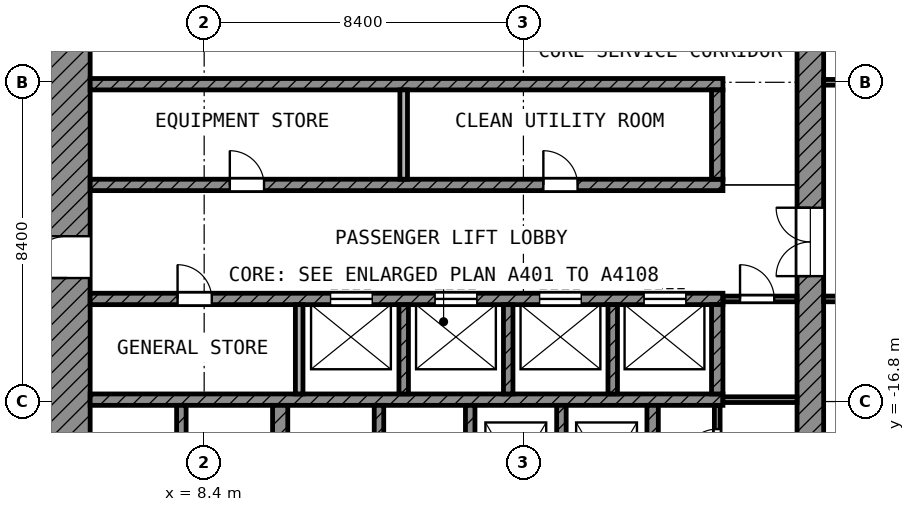
"""IFC4 building model, lengths in metres.
Left out: names, types, materials, properties, quantities, classifications, styles, units other than length and angle.
Written with IfcOpenShell. Run it as: python <this file> out.ifc"""

import sys

from ifc_helpers import new_model, si_unit, direction, frame, frame_2d, origin, place, context, subcontext, project, spatial, rectangle, extrude, element, fill, save


model = new_model("IFC4")
c1 = context("Model", 3, precision=1e-05, world=origin(), true_north=direction((0.0, 1.0)))
c2 = subcontext(c1, "Body", "Model", "MODEL_VIEW")
j1 = project(units=[si_unit("LENGTHUNIT", "METRE"), si_unit("PLANEANGLEUNIT", "RADIAN")], contexts=[c1])
p1 = place(None, origin())
s1 = spatial("IfcSite", under=j1, at=p1, CompositionType="ELEMENT")
p2 = place(p1, origin())
s2 = spatial("IfcBuilding", under=s1, at=p2, CompositionType="ELEMENT")
p3 = place(p2, frame((0.0, 0.0, 302.8)))
s3 = spatial("IfcBuildingStorey", under=s2, at=p3, CompositionType="ELEMENT", Elevation=302.8)
p4 = place(p3, frame((4.8, -24.7, 0.0), z_axis=(0.0, 0.0, 1.0), x_axis=(0.0, 1.0, 0.0)))
e1 = element("IfcWall", 1, at=p4, inside=s3, PredefinedType="SHEAR", context=c2, shape_type="SweptSolid", body=[
    extrude(rectangle(XDim=19.3, YDim=1.2, at=frame_2d((9.65, 0.0))), origin(), (0.0, 0.0, 1.0), 3.6),
])
p5 = place(p4, frame((11.15, 0.0, 0.0)))
e2 = element("IfcOpeningElement", 2, at=p5, cuts=e1, PredefinedType="OPENING", context=c2, shape_type="SweptSolid", body=[
    extrude(rectangle(XDim=1.1, YDim=2.1, at=frame_2d((0.55, 1.05))), frame((0.0, 0.61, 0.0), z_axis=(0.0, -1.0, 0.0), x_axis=(1.0, 0.0, 0.0)), (0.0, 0.0, 1.0), 1.22),
])
p6 = place(p4, frame((1.85, 0.0, 0.0)))
e3 = element("IfcOpeningElement", 3, at=p6, cuts=e1, PredefinedType="OPENING", context=c2, shape_type="SweptSolid", body=[
    extrude(rectangle(XDim=1.1, YDim=2.1, at=frame_2d((0.55, 1.05))), frame((0.0, 0.61, 0.0), z_axis=(0.0, -1.0, 0.0), x_axis=(1.0, 0.0, 0.0)), (0.0, 0.0, 1.0), 1.22),
])
p7 = place(p3, frame((24.35, -24.0, 0.0), z_axis=(0.0, 0.0, 1.0), x_axis=(0.0, 1.0, 0.0)))
e4 = element("IfcWall", 4, at=p7, inside=s3, PredefinedType="SHEAR", context=c2, shape_type="SweptSolid", body=[
    extrude(rectangle(XDim=18.6, YDim=0.7, at=frame_2d((9.3, 0.0))), origin(), (0.0, 0.0, 1.0), 3.6),
])
p8 = place(p7, frame((10.5, 0.0, 0.0)))
e5 = element("IfcOpeningElement", 5, at=p8, cuts=e4, PredefinedType="OPENING", context=c2, shape_type="SweptSolid", body=[
    extrude(rectangle(XDim=1.8, YDim=2.1, at=frame_2d((0.9, 1.05))), frame((0.0, 0.36, 0.0), z_axis=(0.0, -1.0, 0.0), x_axis=(1.0, 0.0, 0.0)), (0.0, 0.0, 1.0), 0.72),
])
p9 = place(p3, frame((5.4, -8.45, 0.0), z_axis=(0.0, 0.0, 1.0), x_axis=(1.0, 0.0, 0.0)))
e6 = element("IfcWall", 6, at=p9, inside=s3, PredefinedType="SHEAR", context=c2, shape_type="SweptSolid", body=[
    extrude(rectangle(XDim=16.65, YDim=0.3, at=frame_2d((8.325, 0.0))), origin(), (0.0, 0.0, 1.0), 3.6),
])
p10 = place(p3, frame((5.4, -11.1, 0.0), z_axis=(0.0, 0.0, 1.0), x_axis=(1.0, 0.0, 0.0)))
e7 = element("IfcWall", 7, at=p10, inside=s3, PredefinedType="SHEAR", context=c2, shape_type="SweptSolid", body=[
    extrude(rectangle(XDim=16.65, YDim=0.3, at=frame_2d((8.325, 0.0))), origin(), (0.0, 0.0, 1.0), 3.6),
])
p11 = place(p10, frame((3.675, 0.0, 0.0)))
e8 = element("IfcOpeningElement", 8, at=p11, cuts=e7, PredefinedType="OPENING", context=c2, shape_type="SweptSolid", body=[
    extrude(rectangle(XDim=0.9, YDim=2.1, at=frame_2d((0.45, 1.05))), frame((0.0, 0.16, 0.0), z_axis=(0.0, -1.0, 0.0), x_axis=(1.0, 0.0, 0.0)), (0.0, 0.0, 1.0), 0.32),
])
p12 = place(p10, frame((11.925, 0.0, 0.0)))
e9 = element("IfcOpeningElement", 9, at=p12, cuts=e7, PredefinedType="OPENING", context=c2, shape_type="SweptSolid", body=[
    extrude(rectangle(XDim=0.9, YDim=2.1, at=frame_2d((0.45, 1.05))), frame((0.0, 0.16, 0.0), z_axis=(0.0, -1.0, 0.0), x_axis=(1.0, 0.0, 0.0)), (0.0, 0.0, 1.0), 0.32),
])
p13 = place(p3, frame((5.4, -14.1, 0.0), z_axis=(0.0, 0.0, 1.0), x_axis=(1.0, 0.0, 0.0)))
e10 = element("IfcWall", 10, at=p13, inside=s3, PredefinedType="SHEAR", context=c2, shape_type="SweptSolid", body=[
    extrude(rectangle(XDim=16.65, YDim=0.3, at=frame_2d((8.325, 0.0))), origin(), (0.0, 0.0, 1.0), 3.6),
])
p14 = place(p13, frame((6.325, 0.0, 0.0)))
e11 = element("IfcOpeningElement", 11, at=p14, cuts=e10, PredefinedType="OPENING", context=c2, shape_type="SweptSolid", body=[
    extrude(rectangle(XDim=1.1, YDim=2.1, at=frame_2d((0.55, 1.05))), frame((0.0, 0.16, 0.0), z_axis=(0.0, -1.0, 0.0), x_axis=(1.0, 0.0, 0.0)), (0.0, 0.0, 1.0), 0.32),
])
p15 = place(p13, frame((9.075, 0.0, 0.0)))
e12 = element("IfcOpeningElement", 12, at=p15, cuts=e10, PredefinedType="OPENING", context=c2, shape_type="SweptSolid", body=[
    extrude(rectangle(XDim=1.1, YDim=2.1, at=frame_2d((0.55, 1.05))), frame((0.0, 0.16, 0.0), z_axis=(0.0, -1.0, 0.0), x_axis=(1.0, 0.0, 0.0)), (0.0, 0.0, 1.0), 0.32),
])
p16 = place(p13, frame((11.825, 0.0, 0.0)))
e13 = element("IfcOpeningElement", 13, at=p16, cuts=e10, PredefinedType="OPENING", context=c2, shape_type="SweptSolid", body=[
    extrude(rectangle(XDim=1.1, YDim=2.1, at=frame_2d((0.55, 1.05))), frame((0.0, 0.16, 0.0), z_axis=(0.0, -1.0, 0.0), x_axis=(1.0, 0.0, 0.0)), (0.0, 0.0, 1.0), 0.32),
])
p17 = place(p13, frame((14.575, 0.0, 0.0)))
e14 = element("IfcOpeningElement", 14, at=p17, cuts=e10, PredefinedType="OPENING", context=c2, shape_type="SweptSolid", body=[
    extrude(rectangle(XDim=1.1, YDim=2.1, at=frame_2d((0.55, 1.05))), frame((0.0, 0.16, 0.0), z_axis=(0.0, -1.0, 0.0), x_axis=(1.0, 0.0, 0.0)), (0.0, 0.0, 1.0), 0.32),
])
p18 = place(p13, frame((2.3, 0.0, 0.0)))
e15 = element("IfcOpeningElement", 15, at=p18, cuts=e10, PredefinedType="OPENING", context=c2, shape_type="SweptSolid", body=[
    extrude(rectangle(XDim=0.9, YDim=2.1, at=frame_2d((0.45, 1.05))), frame((0.0, 0.16, 0.0), z_axis=(0.0, -1.0, 0.0), x_axis=(1.0, 0.0, 0.0)), (0.0, 0.0, 1.0), 0.32),
])
p19 = place(p3, frame((5.4, -16.75, 0.0), z_axis=(0.0, 0.0, 1.0), x_axis=(1.0, 0.0, 0.0)))
e16 = element("IfcWall", 16, at=p19, inside=s3, PredefinedType="SHEAR", context=c2, shape_type="SweptSolid", body=[
    extrude(rectangle(XDim=16.65, YDim=0.3, at=frame_2d((8.325, 0.0))), origin(), (0.0, 0.0, 1.0), 3.6),
])
p20 = place(p3, frame((10.4, -20.05, 0.0), z_axis=(0.0, 0.0, 1.0), x_axis=(0.0, 1.0, 0.0)))
e17 = element("IfcWall", 17, at=p20, inside=s3, PredefinedType="SHEAR", context=c2, shape_type="SweptSolid", body=[
    extrude(rectangle(XDim=3.15, YDim=0.4, at=frame_2d((1.575, 0.0))), origin(), (0.0, 0.0, 1.0), 3.6),
])
p21 = place(p3, frame((20.2, -20.35, 0.0), z_axis=(0.0, 0.0, 1.0), x_axis=(0.0, 1.0, 0.0)))
e18 = element("IfcWall", 18, at=p21, inside=s3, PredefinedType="SHEAR", context=c2, shape_type="SweptSolid", body=[
    extrude(rectangle(XDim=3.45, YDim=0.3, at=frame_2d((1.725, 0.0))), origin(), (0.0, 0.0, 1.0), 3.6),
])
p22 = place(p3, frame((21.9, -10.95, 0.0), z_axis=(0.0, 0.0, 1.0), x_axis=(0.0, 1.0, 0.0)))
e19 = element("IfcWall", 19, at=p22, inside=s3, PredefinedType="SHEAR", context=c2, shape_type="SweptSolid", body=[
    extrude(rectangle(XDim=2.35, YDim=0.3, at=frame_2d((1.175, 0.0))), origin(), (0.0, 0.0, 1.0), 3.6),
])
p23 = place(p3, frame((21.9, -16.6, 0.0), z_axis=(0.0, 0.0, 1.0), x_axis=(0.0, 1.0, 0.0)))
e20 = element("IfcWall", 20, at=p23, inside=s3, PredefinedType="SHEAR", context=c2, shape_type="SweptSolid", body=[
    extrude(rectangle(XDim=2.35, YDim=0.3, at=frame_2d((1.175, 0.0))), origin(), (0.0, 0.0, 1.0), 3.6),
])
for number, where, z_axis, x_axis in (
    (21, (7.8, -20.05, 0.0), (0.0, 0.0, 1.0), (0.0, 1.0, 0.0)),
    (22, (13.0, -20.05, 0.0), (0.0, 0.0, 1.0), (0.0, 1.0, 0.0)),
    (23, (15.4, -20.05, 0.0), (0.0, 0.0, 1.0), (0.0, 1.0, 0.0)),
    (24, (17.8, -20.05, 0.0), (0.0, 0.0, 1.0), (0.0, 1.0, 0.0)),
):
    element("IfcWall", number, at=place(p3, frame(where, z_axis=z_axis, x_axis=x_axis)), inside=s3, PredefinedType="SHEAR", context=c2, shape_type="SweptSolid", body=[
        extrude(rectangle(XDim=3.15, YDim=0.25, at=frame_2d((1.575, 0.0))), origin(), (0.0, 0.0, 1.0), 3.6),
    ])
p24 = place(p3, frame((13.65, -10.95, 0.0), z_axis=(0.0, 0.0, 1.0), x_axis=(0.0, 1.0, 0.0)))
e25 = element("IfcWall", 25, at=p24, inside=s3, PredefinedType="PARTITIONING", context=c2, shape_type="SweptSolid", body=[
    extrude(rectangle(XDim=2.35, YDim=0.2, at=frame_2d((1.175, 0.0))), origin(), (0.0, 0.0, 1.0), 3.6),
])
p25 = place(p3, frame((10.9, -16.6, 0.0), z_axis=(0.0, 0.0, 1.0), x_axis=(0.0, 1.0, 0.0)))
e26 = element("IfcWall", 26, at=p25, inside=s3, PredefinedType="PARTITIONING", context=c2, shape_type="SweptSolid", body=[
    extrude(rectangle(XDim=2.35, YDim=0.2, at=frame_2d((1.175, 0.0))), origin(), (0.0, 0.0, 1.0), 3.6),
])
for number, where, z_axis, x_axis in (
    (27, (13.65, -16.6, 0.0), (0.0, 0.0, 1.0), (0.0, 1.0, 0.0)),
    (28, (16.4, -16.6, 0.0), (0.0, 0.0, 1.0), (0.0, 1.0, 0.0)),
    (29, (19.15, -16.6, 0.0), (0.0, 0.0, 1.0), (0.0, 1.0, 0.0)),
):
    element("IfcWall", number, at=place(p3, frame(where, z_axis=z_axis, x_axis=x_axis)), inside=s3, PredefinedType="SHEAR", context=c2, shape_type="SweptSolid", body=[
        extrude(rectangle(XDim=2.35, YDim=0.25, at=frame_2d((1.175, 0.0))), origin(), (0.0, 0.0, 1.0), 3.6),
    ])
p26 = place(p3, frame((21.9, -19.05, 0.0), z_axis=(0.0, 0.0, 1.0), x_axis=(0.0, 1.0, 0.0)))
e30 = element("IfcWall", 30, at=p26, inside=s3, PredefinedType="PARTITIONING", context=c2, shape_type="SweptSolid", body=[
    extrude(rectangle(XDim=2.15, YDim=0.15, at=frame_2d((1.075, 0.0))), origin(), (0.0, 0.0, 1.0), 3.6),
])
p27 = place(p26, frame((0.625, 0.0, 0.0)))
e31 = element("IfcOpeningElement", 31, at=p27, cuts=e30, PredefinedType="OPENING", context=c2, shape_type="SweptSolid", body=[
    extrude(rectangle(XDim=0.9, YDim=2.1, at=frame_2d((0.45, 1.05))), frame((0.0, 0.085, 0.0), z_axis=(0.0, -1.0, 0.0), x_axis=(1.0, 0.0, 0.0)), (0.0, 0.0, 1.0), 0.17),
])
p28 = place(p3, frame((22.05, -16.75, 0.0), z_axis=(0.0, 0.0, 1.0), x_axis=(1.0, 0.0, 0.0)))
e32 = element("IfcWall", 32, at=p28, inside=s3, PredefinedType="PARTITIONING", context=c2, shape_type="SweptSolid", body=[
    extrude(rectangle(XDim=1.95, YDim=0.15, at=frame_2d((0.975, 0.0))), origin(), (0.0, 0.0, 1.0), 3.6),
])
p29 = place(p3, frame((22.05, -14.1, 0.0), z_axis=(0.0, 0.0, 1.0), x_axis=(1.0, 0.0, 0.0)))
e33 = element("IfcWall", 33, at=p29, inside=s3, PredefinedType="PARTITIONING", context=c2, shape_type="SweptSolid", body=[
    extrude(rectangle(XDim=1.95, YDim=0.15, at=frame_2d((0.975, 0.0))), origin(), (0.0, 0.0, 1.0), 3.6),
])
p30 = place(p29, frame((0.45, 0.0, 0.0)))
e34 = element("IfcOpeningElement", 34, at=p30, cuts=e33, PredefinedType="OPENING", context=c2, shape_type="SweptSolid", body=[
    extrude(rectangle(XDim=0.9, YDim=2.1, at=frame_2d((0.45, 1.05))), frame((0.0, 0.085, 0.0), z_axis=(0.0, -1.0, 0.0), x_axis=(1.0, 0.0, 0.0)), (0.0, 0.0, 1.0), 0.17),
])
p31 = place(p3, frame((24.7, -14.1, 0.0), z_axis=(0.0, 0.0, 1.0), x_axis=(1.0, 0.0, 0.0)))
e35 = element("IfcWall", 35, at=p31, inside=s3, PredefinedType="PARTITIONING", context=c2, shape_type="SweptSolid", body=[
    extrude(rectangle(XDim=4.625, YDim=0.15, at=frame_2d((2.312, 0.0))), origin(), (0.0, 0.0, 1.0), 3.6),
])
p32 = place(p31, frame((1.85, 0.0, 0.0)))
e36 = element("IfcOpeningElement", 36, at=p32, cuts=e35, PredefinedType="OPENING", context=c2, shape_type="SweptSolid", body=[
    extrude(rectangle(XDim=1.5, YDim=2.1, at=frame_2d((0.75, 1.05))), frame((0.0, 0.085, 0.0), z_axis=(0.0, -1.0, 0.0), x_axis=(1.0, 0.0, 0.0)), (0.0, 0.0, 1.0), 0.17),
])
p33 = place(p3, frame((24.7, -8.4, 0.0), z_axis=(0.0, 0.0, 1.0), x_axis=(1.0, 0.0, 0.0)))
e37 = element("IfcWall", 37, at=p33, inside=s3, PredefinedType="PARTITIONING", context=c2, shape_type="SweptSolid", body=[
    extrude(rectangle(XDim=15.582, YDim=0.15, at=frame_2d((7.791, 0.0))), origin(), (0.0, 0.0, 1.0), 3.6),
])
p34 = place(p33, frame((9.35, 0.0, 0.0)))
e38 = element("IfcOpeningElement", 38, at=p34, cuts=e37, PredefinedType="OPENING", context=c2, shape_type="SweptSolid", body=[
    extrude(rectangle(XDim=1.1, YDim=2.1, at=frame_2d((0.55, 1.05))), frame((0.0, 0.085, 0.0), z_axis=(0.0, -1.0, 0.0), x_axis=(1.0, 0.0, 0.0)), (0.0, 0.0, 1.0), 0.17),
])
p35 = place(p33, frame((1.05, 0.0, 0.0)))
e39 = element("IfcOpeningElement", 39, at=p35, cuts=e37, PredefinedType="OPENING", context=c2, shape_type="SweptSolid", body=[
    extrude(rectangle(XDim=1.0, YDim=2.1, at=frame_2d((0.5, 1.05))), frame((0.0, 0.085, 0.0), z_axis=(0.0, -1.0, 0.0), x_axis=(1.0, 0.0, 0.0)), (0.0, 0.0, 1.0), 0.17),
])
p36 = place(p33, frame((5.15, 0.0, 0.0)))
e40 = element("IfcOpeningElement", 40, at=p36, cuts=e37, PredefinedType="OPENING", context=c2, shape_type="SweptSolid", body=[
    extrude(rectangle(XDim=1.2, YDim=2.1, at=frame_2d((0.6, 1.05))), frame((0.0, 0.085, 0.0), z_axis=(0.0, -1.0, 0.0), x_axis=(1.0, 0.0, 0.0)), (0.0, 0.0, 1.0), 0.17),
])
p37 = place(p14, origin())
e41 = element("IfcDoor", 41, at=p37, inside=s3, OperationType="DOUBLE_DOOR_SLIDING", PredefinedType="DOOR", context=c2, shape_type="SweptSolid", body=[
    extrude(rectangle(XDim=1.1, YDim=2.1, at=frame_2d((0.55, 1.05))), frame((0.0, 0.025, 0.0), z_axis=(0.0, -1.0, 0.0), x_axis=(1.0, 0.0, 0.0)), (0.0, 0.0, 1.0), 0.05),
])
fill(e11, e41)
p38 = place(p15, origin())
e42 = element("IfcDoor", 42, at=p38, inside=s3, OperationType="DOUBLE_DOOR_SLIDING", PredefinedType="DOOR", context=c2, shape_type="SweptSolid", body=[
    extrude(rectangle(XDim=1.1, YDim=2.1, at=frame_2d((0.55, 1.05))), frame((0.0, 0.025, 0.0), z_axis=(0.0, -1.0, 0.0), x_axis=(1.0, 0.0, 0.0)), (0.0, 0.0, 1.0), 0.05),
])
fill(e12, e42)
p39 = place(p16, origin())
e43 = element("IfcDoor", 43, at=p39, inside=s3, OperationType="DOUBLE_DOOR_SLIDING", PredefinedType="DOOR", context=c2, shape_type="SweptSolid", body=[
    extrude(rectangle(XDim=1.1, YDim=2.1, at=frame_2d((0.55, 1.05))), frame((0.0, 0.025, 0.0), z_axis=(0.0, -1.0, 0.0), x_axis=(1.0, 0.0, 0.0)), (0.0, 0.0, 1.0), 0.05),
])
fill(e13, e43)
p40 = place(p17, origin())
e44 = element("IfcDoor", 44, at=p40, inside=s3, OperationType="DOUBLE_DOOR_SLIDING", PredefinedType="DOOR", context=c2, shape_type="SweptSolid", body=[
    extrude(rectangle(XDim=1.1, YDim=2.1, at=frame_2d((0.55, 1.05))), frame((0.0, 0.025, 0.0), z_axis=(0.0, -1.0, 0.0), x_axis=(1.0, 0.0, 0.0)), (0.0, 0.0, 1.0), 0.05),
])
fill(e14, e44)
p41 = place(p5, origin())
e45 = element("IfcDoor", 45, at=p41, inside=s3, OperationType="SINGLE_SWING_LEFT", PredefinedType="DOOR", context=c2, shape_type="SweptSolid", body=[
    extrude(rectangle(XDim=1.1, YDim=2.1, at=frame_2d((0.55, 1.05))), frame((0.0, 0.025, 0.0), z_axis=(0.0, -1.0, 0.0), x_axis=(1.0, 0.0, 0.0)), (0.0, 0.0, 1.0), 0.05),
])
fill(e2, e45)
p42 = place(p8, origin())
e46 = element("IfcDoor", 46, at=p42, inside=s3, OperationType="DOUBLE_DOOR_SINGLE_SWING", PredefinedType="DOOR", context=c2, shape_type="SweptSolid", body=[
    extrude(rectangle(XDim=1.8, YDim=2.1, at=frame_2d((0.9, 1.05))), frame((0.0, 0.025, 0.0), z_axis=(0.0, -1.0, 0.0), x_axis=(1.0, 0.0, 0.0)), (0.0, 0.0, 1.0), 0.05),
])
fill(e5, e46)
p43 = place(p30, origin())
e47 = element("IfcDoor", 47, at=p43, inside=s3, OperationType="SINGLE_SWING_LEFT", PredefinedType="DOOR", context=c2, shape_type="SweptSolid", body=[
    extrude(rectangle(XDim=0.9, YDim=2.1, at=frame_2d((0.45, 1.05))), frame((0.0, 0.025, 0.0), z_axis=(0.0, -1.0, 0.0), x_axis=(1.0, 0.0, 0.0)), (0.0, 0.0, 1.0), 0.05),
])
fill(e34, e47)
p44 = place(p27, origin())
e48 = element("IfcDoor", 48, at=p44, inside=s3, OperationType="SINGLE_SWING_LEFT", PredefinedType="DOOR", context=c2, shape_type="SweptSolid", body=[
    extrude(rectangle(XDim=0.9, YDim=2.1, at=frame_2d((0.45, 1.05))), frame((0.0, 0.025, 0.0), z_axis=(0.0, -1.0, 0.0), x_axis=(1.0, 0.0, 0.0)), (0.0, 0.0, 1.0), 0.05),
])
fill(e31, e48)
p45 = place(p11, origin())
e49 = element("IfcDoor", 49, at=p45, inside=s3, OperationType="SINGLE_SWING_LEFT", PredefinedType="DOOR", context=c2, shape_type="SweptSolid", body=[
    extrude(rectangle(XDim=0.9, YDim=2.1, at=frame_2d((0.45, 1.05))), frame((0.0, 0.025, 0.0), z_axis=(0.0, -1.0, 0.0), x_axis=(1.0, 0.0, 0.0)), (0.0, 0.0, 1.0), 0.05),
])
fill(e8, e49)
p46 = place(p12, origin())
e50 = element("IfcDoor", 50, at=p46, inside=s3, OperationType="SINGLE_SWING_LEFT", PredefinedType="DOOR", context=c2, shape_type="SweptSolid", body=[
    extrude(rectangle(XDim=0.9, YDim=2.1, at=frame_2d((0.45, 1.05))), frame((0.0, 0.025, 0.0), z_axis=(0.0, -1.0, 0.0), x_axis=(1.0, 0.0, 0.0)), (0.0, 0.0, 1.0), 0.05),
])
fill(e9, e50)
p47 = place(p18, origin())
e51 = element("IfcDoor", 51, at=p47, inside=s3, OperationType="SINGLE_SWING_LEFT", PredefinedType="DOOR", context=c2, shape_type="SweptSolid", body=[
    extrude(rectangle(XDim=0.9, YDim=2.1, at=frame_2d((0.45, 1.05))), frame((0.0, 0.025, 0.0), z_axis=(0.0, -1.0, 0.0), x_axis=(1.0, 0.0, 0.0)), (0.0, 0.0, 1.0), 0.05),
])
fill(e15, e51)
save(model, sys.argv[1])
